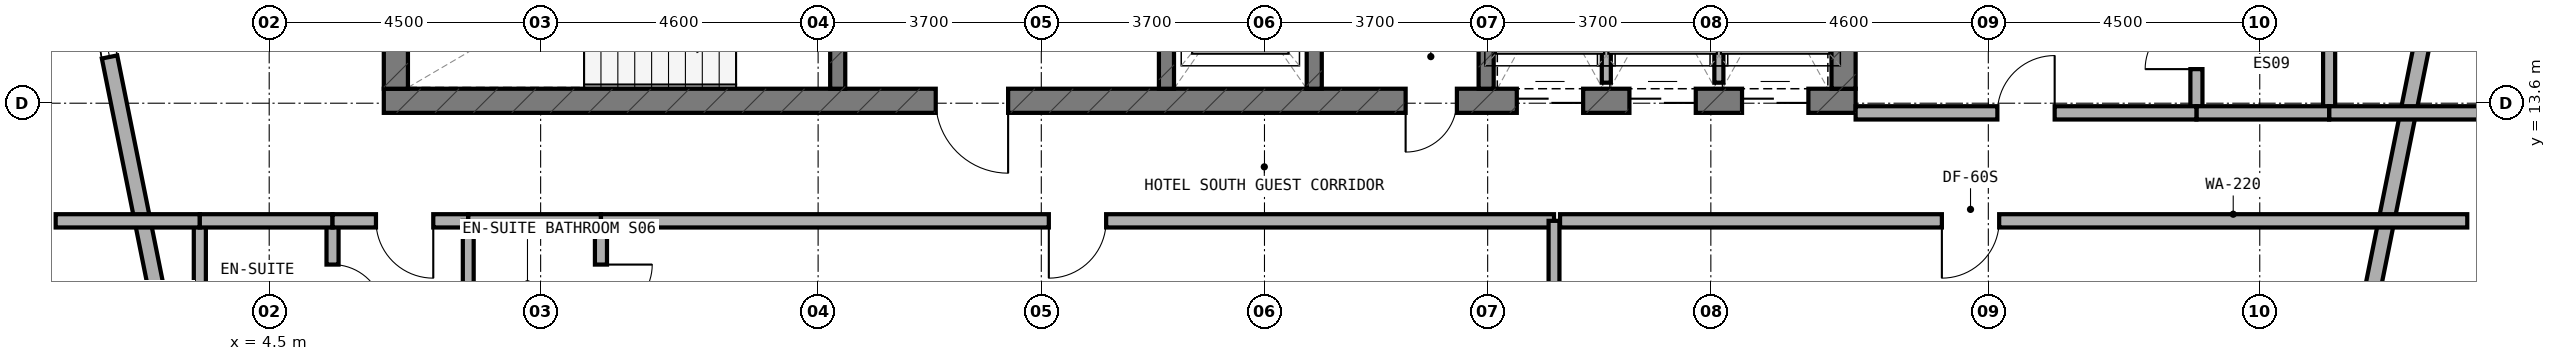
"""IFC4 building model, lengths in metres.
Left out: names, types, materials, properties, quantities, classifications, styles, units other than length and angle.
Written with IfcOpenShell. Run it as: python <this file> out.ifc"""

import sys

from ifc_helpers import new_model, si_unit, direction, frame, frame_2d, origin, place, context, subcontext, project, spatial, rectangle, extrude, element, fill, save


model = new_model("IFC4")
c1 = context("Model", 3, precision=1e-05, world=origin(), true_north=direction((0.0, 1.0)))
c2 = subcontext(c1, "Body", "Model", "MODEL_VIEW")
j1 = project(units=[si_unit("LENGTHUNIT", "METRE"), si_unit("PLANEANGLEUNIT", "RADIAN")], contexts=[c1])
p1 = place(None, origin())
s1 = spatial("IfcSite", under=j1, at=p1, CompositionType="ELEMENT")
p2 = place(p1, origin())
s2 = spatial("IfcBuilding", under=s1, at=p2, CompositionType="ELEMENT")
p3 = place(p2, frame((0.0, 0.0, 152.0)))
s3 = spatial("IfcBuildingStorey", under=s2, at=p3, CompositionType="ELEMENT", Elevation=152.0)
p4 = place(p3, frame((6.4, 13.64, 0.0), z_axis=(0.0, 0.0, 1.0), x_axis=(1.0, 0.0, 0.0)))
e1 = element("IfcWall", 1, at=p4, inside=s3, PredefinedType="SHEAR", context=c2, shape_type="SweptSolid", body=[
    extrude(rectangle(XDim=24.4, YDim=0.4, at=frame_2d((12.2, 0.0))), origin(), (0.0, 0.0, 1.0), 3.5),
])
p5 = place(p4, frame((9.15, 0.0, 0.0)))
e2 = element("IfcOpeningElement", 2, at=p5, cuts=e1, PredefinedType="OPENING", context=c2, shape_type="SweptSolid", body=[
    extrude(rectangle(XDim=1.2, YDim=2.15, at=frame_2d((0.6, 1.075))), frame((0.0, 0.21, 0.0), z_axis=(0.0, -1.0, 0.0), x_axis=(1.0, 0.0, 0.0)), (0.0, 0.0, 1.0), 0.42),
])
p6 = place(p4, frame((16.94, 0.0, 0.0)))
e3 = element("IfcOpeningElement", 3, at=p6, cuts=e1, PredefinedType="OPENING", context=c2, shape_type="SweptSolid", body=[
    extrude(rectangle(XDim=0.85, YDim=2.1, at=frame_2d((0.425, 1.05))), frame((0.0, 0.21, 0.0), z_axis=(0.0, -1.0, 0.0), x_axis=(1.0, 0.0, 0.0)), (0.0, 0.0, 1.0), 0.42),
])
p7 = place(p4, frame((18.783, 0.0, 0.0)))
e4 = element("IfcOpeningElement", 4, at=p7, cuts=e1, PredefinedType="OPENING", context=c2, shape_type="SweptSolid", body=[
    extrude(rectangle(XDim=1.1, YDim=2.15, at=frame_2d((0.55, 1.075))), frame((0.0, 0.21, 0.0), z_axis=(0.0, -1.0, 0.0), x_axis=(1.0, 0.0, 0.0)), (0.0, 0.0, 1.0), 0.42),
])
p8 = place(p4, frame((20.65, 0.0, 0.0)))
e5 = element("IfcOpeningElement", 5, at=p8, cuts=e1, PredefinedType="OPENING", context=c2, shape_type="SweptSolid", body=[
    extrude(rectangle(XDim=1.1, YDim=2.15, at=frame_2d((0.55, 1.075))), frame((0.0, 0.21, 0.0), z_axis=(0.0, -1.0, 0.0), x_axis=(1.0, 0.0, 0.0)), (0.0, 0.0, 1.0), 0.42),
])
p9 = place(p4, frame((22.517, 0.0, 0.0)))
e6 = element("IfcOpeningElement", 6, at=p9, cuts=e1, PredefinedType="OPENING", context=c2, shape_type="SweptSolid", body=[
    extrude(rectangle(XDim=1.1, YDim=2.15, at=frame_2d((0.55, 1.075))), frame((0.0, 0.21, 0.0), z_axis=(0.0, -1.0, 0.0), x_axis=(1.0, 0.0, 0.0)), (0.0, 0.0, 1.0), 0.42),
])
for number, where, z_axis, x_axis in (
    (7, (6.6, 13.84, 0.0), (0.0, 0.0, 1.0), (0.0, 1.0, 0.0)),
    (8, (30.6, 13.84, 0.0), (0.0, 0.0, 1.0), (0.0, 1.0, 0.0)),
):
    element("IfcWall", number, at=place(p3, frame(where, z_axis=z_axis, x_axis=x_axis)), inside=s3, PredefinedType="SHEAR", context=c2, shape_type="SweptSolid", body=[
        extrude(rectangle(XDim=3.16, YDim=0.4, at=frame_2d((1.58, 0.0))), origin(), (0.0, 0.0, 1.0), 3.5),
    ])
p10 = place(p3, frame((13.925, 13.84, 0.0), z_axis=(0.0, 0.0, 1.0), x_axis=(0.0, 1.0, 0.0)))
e9 = element("IfcWall", 9, at=p10, inside=s3, PredefinedType="STANDARD", context=c2, shape_type="SweptSolid", body=[
    extrude(rectangle(XDim=3.16, YDim=0.25, at=frame_2d((1.58, 0.0))), origin(), (0.0, 0.0, 1.0), 3.22),
])
p11 = place(p10, frame((0.98, 0.0, 0.0)))
e10 = element("IfcOpeningElement", 10, at=p11, cuts=e9, PredefinedType="OPENING", context=c2, shape_type="SweptSolid", body=[
    extrude(rectangle(XDim=1.1, YDim=2.15, at=frame_2d((0.55, 1.075))), frame((0.0, 0.135, 0.0), z_axis=(0.0, -1.0, 0.0), x_axis=(1.0, 0.0, 0.0)), (0.0, 0.0, 1.0), 0.27),
])
p12 = place(p3, frame((19.375, 13.84, 0.0), z_axis=(0.0, 0.0, 1.0), x_axis=(0.0, 1.0, 0.0)))
e11 = element("IfcWall", 11, at=p12, inside=s3, PredefinedType="STANDARD", context=c2, shape_type="SweptSolid", body=[
    extrude(rectangle(XDim=3.16, YDim=0.25, at=frame_2d((1.58, 0.0))), origin(), (0.0, 0.0, 1.0), 3.22),
])
p13 = place(p12, frame((0.98, 0.0, 0.0)))
e12 = element("IfcOpeningElement", 12, at=p13, cuts=e11, PredefinedType="OPENING", context=c2, shape_type="SweptSolid", body=[
    extrude(rectangle(XDim=1.1, YDim=2.15, at=frame_2d((0.55, 1.075))), frame((0.0, 0.135, 0.0), z_axis=(0.0, -1.0, 0.0), x_axis=(1.0, 0.0, 0.0)), (0.0, 0.0, 1.0), 0.27),
])
for number, where, z_axis, x_axis in (
    (13, (21.825, 13.84, 0.0), (0.0, 0.0, 1.0), (0.0, 1.0, 0.0)),
    (14, (24.675, 13.84, 0.0), (0.0, 0.0, 1.0), (0.0, 1.0, 0.0)),
):
    element("IfcWall", number, at=place(p3, frame(where, z_axis=z_axis, x_axis=x_axis)), inside=s3, PredefinedType="STANDARD", context=c2, shape_type="SweptSolid", body=[
        extrude(rectangle(XDim=3.16, YDim=0.25, at=frame_2d((1.58, 0.0))), origin(), (0.0, 0.0, 1.0), 3.22),
    ])
p14 = place(p3, frame((39.271, 10.018, 0.0), z_axis=(0.0, 0.0, 1.0), x_axis=(0.197435082048, 0.980315963543, 0.0)))
e15 = element("IfcWall", 15, at=p14, inside=s3, PredefinedType="STANDARD", context=c2, shape_type="SweptSolid", body=[
    extrude(rectangle(XDim=9.183, YDim=0.26, at=frame_2d((4.591, 0.0))), origin(), (0.0, 0.0, 1.0), 3.22),
])
p15 = place(p14, frame((5.349, 0.0, 0.85)))
e16 = element("IfcOpeningElement", 16, at=p15, cuts=e15, PredefinedType="OPENING", context=c2, shape_type="SweptSolid", body=[
    extrude(rectangle(XDim=2.1, YDim=1.5, at=frame_2d((1.05, 0.75))), frame((0.0, 0.14, 0.0), z_axis=(0.0, -1.0, 0.0), x_axis=(1.0, 0.0, 0.0)), (0.0, 0.0, 1.0), 0.28),
])
p16 = place(p3, frame((0.916, 19.02, 0.0), z_axis=(0.0, 0.0, 1.0), x_axis=(0.197435082048, -0.980315963543, 0.0)))
e17 = element("IfcWall", 17, at=p16, inside=s3, PredefinedType="STANDARD", context=c2, shape_type="SweptSolid", body=[
    extrude(rectangle(XDim=9.183, YDim=0.26, at=frame_2d((4.591, 0.0))), origin(), (0.0, 0.0, 1.0), 3.22),
])
p17 = place(p16, frame((2.647, 0.0, 0.85)))
e18 = element("IfcOpeningElement", 18, at=p17, cuts=e17, PredefinedType="OPENING", context=c2, shape_type="SweptSolid", body=[
    extrude(rectangle(XDim=2.1, YDim=1.5, at=frame_2d((1.05, 0.75))), frame((0.0, 0.14, 0.0), z_axis=(0.0, -1.0, 0.0), x_axis=(1.0, 0.0, 0.0)), (0.0, 0.0, 1.0), 0.28),
])
p18 = place(p3, frame((26.667, 13.94, 0.0), z_axis=(0.0, 0.0, 1.0), x_axis=(0.0, 1.0, 0.0)))
e19 = element("IfcWall", 19, at=p18, inside=s3, PredefinedType="PARTITIONING", context=c2, shape_type="SweptSolid", body=[
    extrude(rectangle(XDim=2.96, YDim=0.15, at=frame_2d((1.48, 0.0))), origin(), (0.0, 0.0, 1.0), 3.22),
])
p19 = place(p3, frame((28.533, 13.94, 0.0), z_axis=(0.0, 0.0, 1.0), x_axis=(0.0, 1.0, 0.0)))
e20 = element("IfcWall", 20, at=p19, inside=s3, PredefinedType="PARTITIONING", context=c2, shape_type="SweptSolid", body=[
    extrude(rectangle(XDim=2.96, YDim=0.15, at=frame_2d((1.48, 0.0))), origin(), (0.0, 0.0, 1.0), 2.795),
])
p20 = place(p3, frame((5.55, 9.45, 0.0), z_axis=(0.0, 0.0, 1.0), x_axis=(0.0, 1.0, 0.0)))
e21 = element("IfcWall", 21, at=p20, inside=s3, PredefinedType="PLUMBINGWALL", context=c2, shape_type="SweptSolid", body=[
    extrude(rectangle(XDim=2.1, YDim=0.2, at=frame_2d((1.05, 0.0))), origin(), (0.0, 0.0, 1.0), 3.22),
])
p21 = place(p20, frame((0.625, 0.0, 0.0)))
e22 = element("IfcOpeningElement", 22, at=p21, cuts=e21, PredefinedType="OPENING", context=c2, shape_type="SweptSolid", body=[
    extrude(rectangle(XDim=0.85, YDim=2.1, at=frame_2d((0.425, 1.05))), frame((0.0, 0.11, 0.0), z_axis=(0.0, -1.0, 0.0), x_axis=(1.0, 0.0, 0.0)), (0.0, 0.0, 1.0), 0.22),
])
p22 = place(p3, frame((3.35, 9.45, 0.0), z_axis=(0.0, 0.0, 1.0), x_axis=(0.0, 1.0, 0.0)))
e23 = element("IfcWall", 23, at=p22, inside=s3, PredefinedType="PLUMBINGWALL", context=c2, shape_type="SweptSolid", body=[
    extrude(rectangle(XDim=2.1, YDim=0.2, at=frame_2d((1.05, 0.0))), origin(), (0.0, 0.0, 1.0), 3.22),
])
p23 = place(p3, frame((0.96, 11.65, 0.0), z_axis=(0.0, 0.0, 1.0), x_axis=(1.0, 0.0, 0.0)))
e24 = element("IfcWall", 24, at=p23, inside=s3, PredefinedType="SOLIDWALL", context=c2, shape_type="SweptSolid", body=[
    extrude(rectangle(XDim=2.39, YDim=0.22, at=frame_2d((1.195, 0.0))), origin(), (0.0, 0.0, 1.0), 3.22),
])
p24 = place(p3, frame((3.35, 11.65, 0.0), z_axis=(0.0, 0.0, 1.0), x_axis=(1.0, 0.0, 0.0)))
e25 = element("IfcWall", 25, at=p24, inside=s3, PredefinedType="SOLIDWALL", context=c2, shape_type="SweptSolid", body=[
    extrude(rectangle(XDim=2.2, YDim=0.22, at=frame_2d((1.1, 0.0))), origin(), (0.0, 0.0, 1.0), 3.22),
])
p25 = place(p3, frame((5.55, 11.65, 0.0), z_axis=(0.0, 0.0, 1.0), x_axis=(1.0, 0.0, 0.0)))
e26 = element("IfcWall", 26, at=p25, inside=s3, PredefinedType="SOLIDWALL", context=c2, shape_type="SweptSolid", body=[
    extrude(rectangle(XDim=2.25, YDim=0.22, at=frame_2d((1.125, 0.0))), origin(), (0.0, 0.0, 1.0), 2.795),
])
p26 = place(p25, frame((0.72, 0.0, 0.0)))
e27 = element("IfcOpeningElement", 27, at=p26, cuts=e26, PredefinedType="OPENING", context=c2, shape_type="SweptSolid", body=[
    extrude(rectangle(XDim=0.95, YDim=2.1, at=frame_2d((0.475, 1.05))), frame((0.0, 0.12, 0.0), z_axis=(0.0, -1.0, 0.0), x_axis=(1.0, 0.0, 0.0)), (0.0, 0.0, 1.0), 0.24),
])
p27 = place(p3, frame((7.8, 6.299, 0.0), z_axis=(0.0, 0.0, 1.0), x_axis=(0.0, 1.0, 0.0)))
e28 = element("IfcWall", 28, at=p27, inside=s3, PredefinedType="SOLIDWALL", context=c2, shape_type="SweptSolid", body=[
    extrude(rectangle(XDim=5.351, YDim=0.18, at=frame_2d((2.675, 0.0))), origin(), (0.0, 0.0, 1.0), 2.795),
])
p28 = place(p3, frame((10.0, 9.45, 0.0), z_axis=(0.0, 0.0, 1.0), x_axis=(0.0, 1.0, 0.0)))
e29 = element("IfcWall", 29, at=p28, inside=s3, PredefinedType="PLUMBINGWALL", context=c2, shape_type="SweptSolid", body=[
    extrude(rectangle(XDim=2.1, YDim=0.2, at=frame_2d((1.05, 0.0))), origin(), (0.0, 0.0, 1.0), 2.745),
])
p29 = place(p28, frame((0.625, 0.0, 0.0)))
e30 = element("IfcOpeningElement", 30, at=p29, cuts=e29, PredefinedType="OPENING", context=c2, shape_type="SweptSolid", body=[
    extrude(rectangle(XDim=0.85, YDim=2.1, at=frame_2d((0.425, 1.05))), frame((0.0, 0.11, 0.0), z_axis=(0.0, -1.0, 0.0), x_axis=(1.0, 0.0, 0.0)), (0.0, 0.0, 1.0), 0.22),
])
p30 = place(p3, frame((7.8, 11.65, 0.0), z_axis=(0.0, 0.0, 1.0), x_axis=(1.0, 0.0, 0.0)))
e31 = element("IfcWall", 31, at=p30, inside=s3, PredefinedType="SOLIDWALL", context=c2, shape_type="SweptSolid", body=[
    extrude(rectangle(XDim=2.2, YDim=0.22, at=frame_2d((1.1, 0.0))), origin(), (0.0, 0.0, 1.0), 2.795),
])
p31 = place(p3, frame((10.0, 11.65, 0.0), z_axis=(0.0, 0.0, 1.0), x_axis=(1.0, 0.0, 0.0)))
e32 = element("IfcWall", 32, at=p31, inside=s3, PredefinedType="SOLIDWALL", context=c2, shape_type="SweptSolid", body=[
    extrude(rectangle(XDim=15.8, YDim=0.22, at=frame_2d((7.9, 0.0))), origin(), (0.0, 0.0, 1.0), 2.795),
])
p32 = place(p31, frame((7.425, 0.0, 0.0)))
e33 = element("IfcOpeningElement", 33, at=p32, cuts=e32, PredefinedType="OPENING", context=c2, shape_type="SweptSolid", body=[
    extrude(rectangle(XDim=0.95, YDim=2.1, at=frame_2d((0.475, 1.05))), frame((0.0, 0.12, 0.0), z_axis=(0.0, -1.0, 0.0), x_axis=(1.0, 0.0, 0.0)), (0.0, 0.0, 1.0), 0.24),
])
p33 = place(p3, frame((25.8, 4.86, 0.0), z_axis=(0.0, 0.0, 1.0), x_axis=(0.0, 1.0, 0.0)))
e34 = element("IfcWall", 34, at=p33, inside=s3, PredefinedType="SOLIDWALL", context=c2, shape_type="SweptSolid", body=[
    extrude(rectangle(XDim=6.79, YDim=0.18, at=frame_2d((3.395, 0.0))), origin(), (0.0, 0.0, 1.0), 2.795),
])
p34 = place(p3, frame((25.9, 11.65, 0.0), z_axis=(0.0, 0.0, 1.0), x_axis=(1.0, 0.0, 0.0)))
e35 = element("IfcWall", 35, at=p34, inside=s3, PredefinedType="SOLIDWALL", context=c2, shape_type="SweptSolid", body=[
    extrude(rectangle(XDim=15.04, YDim=0.22, at=frame_2d((7.52, 0.0))), origin(), (0.0, 0.0, 1.0), 2.795),
])
p35 = place(p34, frame((6.33, 0.0, 0.0)))
e36 = element("IfcOpeningElement", 36, at=p35, cuts=e35, PredefinedType="OPENING", context=c2, shape_type="SweptSolid", body=[
    extrude(rectangle(XDim=0.95, YDim=2.1, at=frame_2d((0.475, 1.05))), frame((0.0, 0.12, 0.0), z_axis=(0.0, -1.0, 0.0), x_axis=(1.0, 0.0, 0.0)), (0.0, 0.0, 1.0), 0.24),
])
p36 = place(p3, frame((36.45, 13.54, 0.0), z_axis=(0.0, 0.0, 1.0), x_axis=(0.0, 1.0, 0.0)))
e37 = element("IfcWall", 37, at=p36, inside=s3, PredefinedType="PLUMBINGWALL", context=c2, shape_type="SweptSolid", body=[
    extrude(rectangle(XDim=2.1, YDim=0.2, at=frame_2d((1.05, 0.0))), origin(), (0.0, 0.0, 1.0), 3.22),
])
p37 = place(p36, frame((0.625, 0.0, 0.0)))
e38 = element("IfcOpeningElement", 38, at=p37, cuts=e37, PredefinedType="OPENING", context=c2, shape_type="SweptSolid", body=[
    extrude(rectangle(XDim=0.85, YDim=2.1, at=frame_2d((0.425, 1.05))), frame((0.0, 0.11, 0.0), z_axis=(0.0, -1.0, 0.0), x_axis=(1.0, 0.0, 0.0)), (0.0, 0.0, 1.0), 0.22),
])
p38 = place(p3, frame((38.65, 13.54, 0.0), z_axis=(0.0, 0.0, 1.0), x_axis=(0.0, 1.0, 0.0)))
e39 = element("IfcWall", 39, at=p38, inside=s3, PredefinedType="PLUMBINGWALL", context=c2, shape_type="SweptSolid", body=[
    extrude(rectangle(XDim=2.1, YDim=0.2, at=frame_2d((1.05, 0.0))), origin(), (0.0, 0.0, 1.0), 3.22),
])
p39 = place(p3, frame((38.65, 13.44, 0.0), z_axis=(0.0, 0.0, 1.0), x_axis=(1.0, 0.0, 0.0)))
e40 = element("IfcWall", 40, at=p39, inside=s3, PredefinedType="SOLIDWALL", context=c2, shape_type="SweptSolid", body=[
    extrude(rectangle(XDim=2.55, YDim=0.22, at=frame_2d((1.275, 0.0))), origin(), (0.0, 0.0, 1.0), 3.22),
])
p40 = place(p3, frame((36.45, 13.44, 0.0), z_axis=(0.0, 0.0, 1.0), x_axis=(1.0, 0.0, 0.0)))
e41 = element("IfcWall", 41, at=p40, inside=s3, PredefinedType="SOLIDWALL", context=c2, shape_type="SweptSolid", body=[
    extrude(rectangle(XDim=2.2, YDim=0.22, at=frame_2d((1.1, 0.0))), origin(), (0.0, 0.0, 1.0), 3.22),
])
p41 = place(p3, frame((30.8, 13.44, 0.0), z_axis=(0.0, 0.0, 1.0), x_axis=(1.0, 0.0, 0.0)))
e42 = element("IfcWall", 42, at=p41, inside=s3, PredefinedType="SOLIDWALL", context=c2, shape_type="SweptSolid", body=[
    extrude(rectangle(XDim=5.65, YDim=0.22, at=frame_2d((2.825, 0.0))), origin(), (0.0, 0.0, 1.0), 2.795),
])
p42 = place(p41, frame((2.35, 0.0, 0.0)))
e43 = element("IfcOpeningElement", 43, at=p42, cuts=e42, PredefinedType="OPENING", context=c2, shape_type="SweptSolid", body=[
    extrude(rectangle(XDim=0.95, YDim=2.1, at=frame_2d((0.475, 1.05))), frame((0.0, 0.12, 0.0), z_axis=(0.0, -1.0, 0.0), x_axis=(1.0, 0.0, 0.0)), (0.0, 0.0, 1.0), 0.24),
])
p43 = place(p17, origin())
e44 = element("IfcWindow", 44, at=p43, inside=s3, PartitioningType="SINGLE_PANEL", PredefinedType="WINDOW", context=c2, shape_type="SweptSolid", body=[
    extrude(rectangle(XDim=2.1, YDim=1.5, at=frame_2d((1.05, 0.75))), frame((0.0, 0.03, 0.0), z_axis=(0.0, -1.0, 0.0), x_axis=(1.0, 0.0, 0.0)), (0.0, 0.0, 1.0), 0.06),
])
fill(e18, e44)
p44 = place(p5, frame((1.2, 0.0, 0.0), z_axis=(0.0, 0.0, 1.0), x_axis=(-1.0, 0.0, 0.0)))
e45 = element("IfcDoor", 45, at=p44, inside=s3, OperationType="SINGLE_SWING_LEFT", PredefinedType="DOOR", context=c2, shape_type="SweptSolid", body=[
    extrude(rectangle(XDim=1.2, YDim=2.15, at=frame_2d((0.6, 1.075))), frame((0.0, 0.025, 0.0), z_axis=(0.0, -1.0, 0.0), x_axis=(1.0, 0.0, 0.0)), (0.0, 0.0, 1.0), 0.05),
])
fill(e2, e45)
p45 = place(p6, frame((0.85, 0.0, 0.0), z_axis=(0.0, 0.0, 1.0), x_axis=(-1.0, 0.0, 0.0)))
e46 = element("IfcDoor", 46, at=p45, inside=s3, OperationType="SINGLE_SWING_RIGHT", PredefinedType="DOOR", context=c2, shape_type="SweptSolid", body=[
    extrude(rectangle(XDim=0.85, YDim=2.1, at=frame_2d((0.425, 1.05))), frame((0.0, 0.025, 0.0), z_axis=(0.0, -1.0, 0.0), x_axis=(1.0, 0.0, 0.0)), (0.0, 0.0, 1.0), 0.05),
])
fill(e3, e46)
p46 = place(p7, frame((1.1, 0.0, 0.0), z_axis=(0.0, 0.0, 1.0), x_axis=(-1.0, 0.0, 0.0)))
e47 = element("IfcDoor", 47, at=p46, inside=s3, OperationType="DOUBLE_DOOR_SLIDING", PredefinedType="DOOR", context=c2, shape_type="SweptSolid", body=[
    extrude(rectangle(XDim=1.1, YDim=2.15, at=frame_2d((0.55, 1.075))), frame((0.0, 0.025, 0.0), z_axis=(0.0, -1.0, 0.0), x_axis=(1.0, 0.0, 0.0)), (0.0, 0.0, 1.0), 0.05),
])
fill(e4, e47)
p47 = place(p8, frame((1.1, 0.0, 0.0), z_axis=(0.0, 0.0, 1.0), x_axis=(-1.0, 0.0, 0.0)))
e48 = element("IfcDoor", 48, at=p47, inside=s3, OperationType="DOUBLE_DOOR_SLIDING", PredefinedType="DOOR", context=c2, shape_type="SweptSolid", body=[
    extrude(rectangle(XDim=1.1, YDim=2.15, at=frame_2d((0.55, 1.075))), frame((0.0, 0.025, 0.0), z_axis=(0.0, -1.0, 0.0), x_axis=(1.0, 0.0, 0.0)), (0.0, 0.0, 1.0), 0.05),
])
fill(e5, e48)
p48 = place(p9, frame((1.1, 0.0, 0.0), z_axis=(0.0, 0.0, 1.0), x_axis=(-1.0, 0.0, 0.0)))
e49 = element("IfcDoor", 49, at=p48, inside=s3, OperationType="DOUBLE_DOOR_SLIDING", PredefinedType="DOOR", context=c2, shape_type="SweptSolid", body=[
    extrude(rectangle(XDim=1.1, YDim=2.15, at=frame_2d((0.55, 1.075))), frame((0.0, 0.025, 0.0), z_axis=(0.0, -1.0, 0.0), x_axis=(1.0, 0.0, 0.0)), (0.0, 0.0, 1.0), 0.05),
])
fill(e6, e49)
p49 = place(p21, frame((0.85, 0.0, 0.0), z_axis=(0.0, 0.0, 1.0), x_axis=(-1.0, 0.0, 0.0)))
e50 = element("IfcDoor", 50, at=p49, inside=s3, OperationType="SINGLE_SWING_RIGHT", PredefinedType="DOOR", context=c2, shape_type="SweptSolid", body=[
    extrude(rectangle(XDim=0.85, YDim=2.1, at=frame_2d((0.425, 1.05))), frame((0.0, 0.025, 0.0), z_axis=(0.0, -1.0, 0.0), x_axis=(1.0, 0.0, 0.0)), (0.0, 0.0, 1.0), 0.05),
])
fill(e22, e50)
p50 = place(p26, frame((0.95, 0.0, 0.0), z_axis=(0.0, 0.0, 1.0), x_axis=(-1.0, 0.0, 0.0)))
e51 = element("IfcDoor", 51, at=p50, inside=s3, OperationType="SINGLE_SWING_LEFT", PredefinedType="DOOR", context=c2, shape_type="SweptSolid", body=[
    extrude(rectangle(XDim=0.95, YDim=2.1, at=frame_2d((0.475, 1.05))), frame((0.0, 0.025, 0.0), z_axis=(0.0, -1.0, 0.0), x_axis=(1.0, 0.0, 0.0)), (0.0, 0.0, 1.0), 0.05),
])
fill(e27, e51)
p51 = place(p29, frame((0.85, 0.0, 0.0), z_axis=(0.0, 0.0, 1.0), x_axis=(-1.0, 0.0, 0.0)))
e52 = element("IfcDoor", 52, at=p51, inside=s3, OperationType="SINGLE_SWING_LEFT", PredefinedType="DOOR", context=c2, shape_type="SweptSolid", body=[
    extrude(rectangle(XDim=0.85, YDim=2.1, at=frame_2d((0.425, 1.05))), frame((0.0, 0.025, 0.0), z_axis=(0.0, -1.0, 0.0), x_axis=(1.0, 0.0, 0.0)), (0.0, 0.0, 1.0), 0.05),
])
fill(e30, e52)
p52 = place(p32, frame((0.95, 0.0, 0.0), z_axis=(0.0, 0.0, 1.0), x_axis=(-1.0, 0.0, 0.0)))
e53 = element("IfcDoor", 53, at=p52, inside=s3, OperationType="SINGLE_SWING_RIGHT", PredefinedType="DOOR", context=c2, shape_type="SweptSolid", body=[
    extrude(rectangle(XDim=0.95, YDim=2.1, at=frame_2d((0.475, 1.05))), frame((0.0, 0.025, 0.0), z_axis=(0.0, -1.0, 0.0), x_axis=(1.0, 0.0, 0.0)), (0.0, 0.0, 1.0), 0.05),
])
fill(e33, e53)
p53 = place(p35, frame((0.95, 0.0, 0.0), z_axis=(0.0, 0.0, 1.0), x_axis=(-1.0, 0.0, 0.0)))
e54 = element("IfcDoor", 54, at=p53, inside=s3, OperationType="SINGLE_SWING_RIGHT", PredefinedType="DOOR", context=c2, shape_type="SweptSolid", body=[
    extrude(rectangle(XDim=0.95, YDim=2.1, at=frame_2d((0.475, 1.05))), frame((0.0, 0.025, 0.0), z_axis=(0.0, -1.0, 0.0), x_axis=(1.0, 0.0, 0.0)), (0.0, 0.0, 1.0), 0.05),
])
fill(e36, e54)
p54 = place(p37, origin())
e55 = element("IfcDoor", 55, at=p54, inside=s3, OperationType="SINGLE_SWING_LEFT", PredefinedType="DOOR", context=c2, shape_type="SweptSolid", body=[
    extrude(rectangle(XDim=0.85, YDim=2.1, at=frame_2d((0.425, 1.05))), frame((0.0, 0.025, 0.0), z_axis=(0.0, -1.0, 0.0), x_axis=(1.0, 0.0, 0.0)), (0.0, 0.0, 1.0), 0.05),
])
fill(e38, e55)
p55 = place(p42, origin())
e56 = element("IfcDoor", 56, at=p55, inside=s3, OperationType="SINGLE_SWING_RIGHT", PredefinedType="DOOR", context=c2, shape_type="SweptSolid", body=[
    extrude(rectangle(XDim=0.95, YDim=2.1, at=frame_2d((0.475, 1.05))), frame((0.0, 0.025, 0.0), z_axis=(0.0, -1.0, 0.0), x_axis=(1.0, 0.0, 0.0)), (0.0, 0.0, 1.0), 0.05),
])
fill(e43, e56)
save(model, sys.argv[1])
